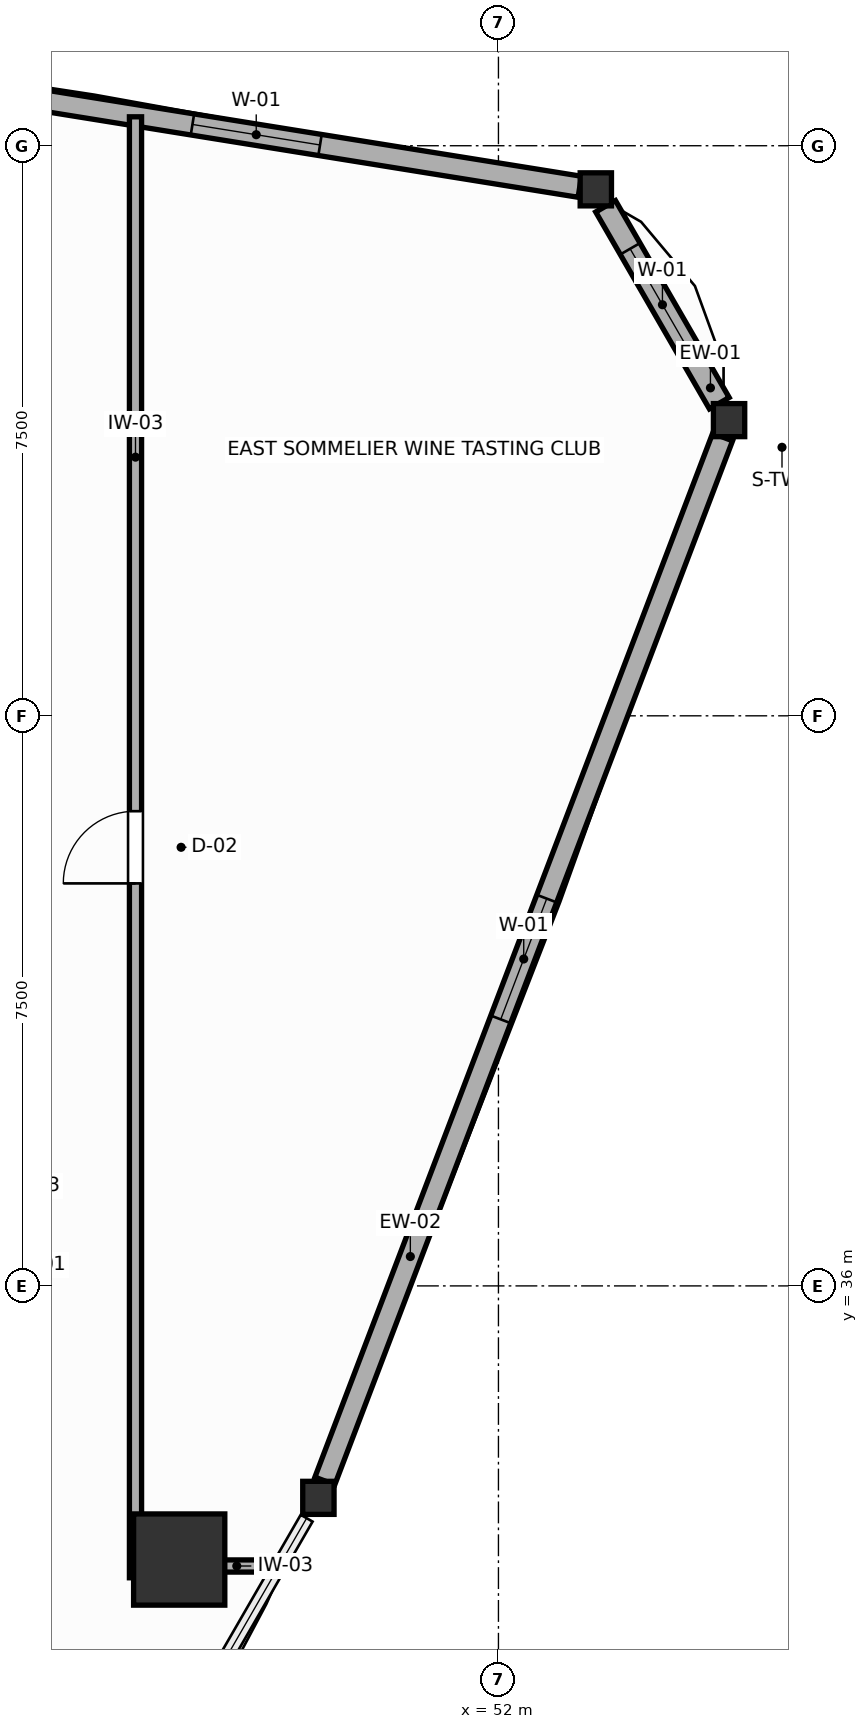
"""IFC4 building model, lengths in metres.
Left out: names, types, materials, properties, quantities, classifications, styles, units other than length and angle.
Written with IfcOpenShell. Run it as: python <this file> out.ifc"""

import sys

from ifc_helpers import new_model, si_unit, direction, frame, frame_2d, origin, origin_2d, place, context, subcontext, project, spatial, rectangle, i_section, extrude, source, transform, mapped, element, fill, save


model = new_model("IFC4")
c1 = context("Model", 3, precision=1e-05, world=origin(), true_north=direction((0.0, 1.0)))
c2 = subcontext(c1, "Body", "Model", "MODEL_VIEW")
j1 = project(units=[si_unit("LENGTHUNIT", "METRE"), si_unit("PLANEANGLEUNIT", "RADIAN")], contexts=[c1])
p1 = place(None, origin())
s1 = spatial("IfcSite", under=j1, at=p1, CompositionType="ELEMENT")
p2 = place(p1, origin())
s2 = spatial("IfcBuilding", under=s1, at=p2, CompositionType="ELEMENT")
p3 = place(p2, frame((0.0, 0.0, 150.6)))
s3 = spatial("IfcBuildingStorey", under=s2, at=p3, CompositionType="ELEMENT", Elevation=150.6)
m1 = source(origin(), c2, "Body", "SweptSolid", [
    extrude(rectangle(XDim=1.2, YDim=1.2, at=origin_2d()), origin(), (0.0, 0.0, 1.0), 3.6),
])
p4 = place(p3, frame((47.8, 32.4, 0.0), z_axis=(0.0, 0.0, 1.0), x_axis=(1.0, 0.0, 0.0)))
e1 = element("IfcColumn", 1, at=p4, inside=s3, PredefinedType="COLUMN", context=c2, shape_type="MappedRepresentation", body=[
    mapped(m1, transform((0.0, 0.0, 0.0), scale=1.0)),
])
m2 = source(origin(), c2, "Body", "SweptSolid", [
    extrude(i_section(OverallWidth=0.412, OverallDepth=0.435, WebThickness=0.033, FlangeThickness=0.053, FilletRadius=0.015, at=origin_2d()), origin(), (0.0, 0.0, 1.0), 3.6),
])
for number, where, z_axis, x_axis in (
    (2, (55.034, 47.39, 0.0), (0.0, 0.0, 1.0), (1.0, 0.0, 0.0)),
    (3, (53.281, 50.426, 0.0), (0.0, 0.0, 1.0), (1.0, 0.0, 0.0)),
    (4, (49.631, 33.212, 0.0), (0.0, 0.0, 1.0), (1.0, 0.0, 0.0)),
):
    element("IfcColumn", number, at=place(p3, frame(where, z_axis=z_axis, x_axis=x_axis)), inside=s3, PredefinedType="COLUMN", context=c2, shape_type="MappedRepresentation", body=[
        mapped(m2, transform((0.0, 0.0, 0.0), scale=1.0)),
    ])
p5 = place(p3, frame((54.906, 47.613, 0.0), z_axis=(0.0, 0.0, 1.0), x_axis=(-0.499974392705, 0.866040187658, 0.0)))
e5 = element("IfcWall", 5, at=p5, inside=s3, PredefinedType="SOLIDWALL", context=c2, shape_type="SweptSolid", body=[
    extrude(rectangle(XDim=2.992, YDim=0.3, at=frame_2d((1.496, 0.0))), origin(), (0.0, 0.0, 1.0), 3.0),
])
p6 = place(p5, frame((0.646, 0.0, 0.75)))
e6 = element("IfcOpeningElement", 6, at=p6, cuts=e5, PredefinedType="OPENING", context=c2, shape_type="SweptSolid", body=[
    extrude(rectangle(XDim=1.7, YDim=1.75, at=frame_2d((0.85, 0.875))), frame((0.0, 0.16, 0.0), z_axis=(0.0, -1.0, 0.0), x_axis=(1.0, 0.0, 0.0)), (0.0, 0.0, 1.0), 0.32),
])
p7 = place(p3, frame((53.07, 50.46, 0.0), z_axis=(0.0, 0.0, 1.0), x_axis=(-0.987303259595, 0.158846698404, 0.0)))
e7 = element("IfcWall", 7, at=p7, inside=s3, PredefinedType="SOLIDWALL", context=c2, shape_type="SweptSolid", body=[
    extrude(rectangle(XDim=14.746, YDim=0.28, at=frame_2d((7.373, 0.0))), origin(), (0.0, 0.0, 1.0), 3.0),
])
p8 = place(p7, frame((3.461, 0.0, 0.75)))
e8 = element("IfcOpeningElement", 8, at=p8, cuts=e7, PredefinedType="OPENING", context=c2, shape_type="SweptSolid", body=[
    extrude(rectangle(XDim=1.7, YDim=1.75, at=frame_2d((0.85, 0.875))), frame((0.0, 0.15, 0.0), z_axis=(0.0, -1.0, 0.0), x_axis=(1.0, 0.0, 0.0)), (0.0, 0.0, 1.0), 0.3),
])
p9 = place(p3, frame((49.716, 33.434, 0.0), z_axis=(0.0, 0.0, 1.0), x_axis=(0.356077530784, 0.934456415287, 0.0)))
e9 = element("IfcWall", 9, at=p9, inside=s3, PredefinedType="SOLIDWALL", context=c2, shape_type="SweptSolid", body=[
    extrude(rectangle(XDim=14.697, YDim=0.28, at=frame_2d((7.348, 0.0))), origin(), (0.0, 0.0, 1.0), 3.0),
])
p10 = place(p9, frame((6.498, 0.0, 0.75)))
e10 = element("IfcOpeningElement", 10, at=p10, cuts=e9, PredefinedType="OPENING", context=c2, shape_type="SweptSolid", body=[
    extrude(rectangle(XDim=1.7, YDim=1.75, at=frame_2d((0.85, 0.875))), frame((0.0, 0.15, 0.0), z_axis=(0.0, -1.0, 0.0), x_axis=(1.0, 0.0, 0.0)), (0.0, 0.0, 1.0), 0.3),
])
p11 = place(p3, frame((47.225, 32.16, 0.0), z_axis=(0.0, 0.0, 1.0), x_axis=(0.0, 1.0, 0.0)))
e11 = element("IfcWall", 11, at=p11, inside=s3, PredefinedType="PARTITIONING", context=c2, shape_type="SweptSolid", body=[
    extrude(rectangle(XDim=19.221, YDim=0.16, at=frame_2d((9.61, 0.0))), origin(), (0.0, 0.0, 1.0), 3.4),
])
p12 = place(p11, frame((9.135, 0.0, 0.0)))
e12 = element("IfcOpeningElement", 12, at=p12, cuts=e11, PredefinedType="OPENING", context=c2, shape_type="SweptSolid", body=[
    extrude(rectangle(XDim=0.95, YDim=2.05, at=frame_2d((0.475, 1.025))), frame((0.0, 0.09, 0.0), z_axis=(0.0, -1.0, 0.0), x_axis=(1.0, 0.0, 0.0)), (0.0, 0.0, 1.0), 0.18),
])
p13 = place(p3, frame((47.307, 32.315, 0.0), z_axis=(0.0, 0.0, 1.0), x_axis=(1.0, 0.0, 0.0)))
e13 = element("IfcWall", 13, at=p13, inside=s3, PredefinedType="PARTITIONING", context=c2, shape_type="SweptSolid", body=[
    extrude(rectangle(XDim=1.787, YDim=0.16, at=frame_2d((0.893, 0.0))), origin(), (0.0, 0.0, 1.0), 2.95),
])
p14 = place(p6, origin())
e14 = element("IfcWindow", 14, at=p14, inside=s3, PartitioningType="SINGLE_PANEL", PredefinedType="WINDOW", context=c2, shape_type="SweptSolid", body=[
    extrude(rectangle(XDim=1.7, YDim=1.75, at=frame_2d((0.85, 0.875))), frame((0.0, 0.03, 0.0), z_axis=(0.0, -1.0, 0.0), x_axis=(1.0, 0.0, 0.0)), (0.0, 0.0, 1.0), 0.06),
])
fill(e6, e14)
p15 = place(p8, origin())
e15 = element("IfcWindow", 15, at=p15, inside=s3, PartitioningType="SINGLE_PANEL", PredefinedType="WINDOW", context=c2, shape_type="SweptSolid", body=[
    extrude(rectangle(XDim=1.7, YDim=1.75, at=frame_2d((0.85, 0.875))), frame((0.0, 0.03, 0.0), z_axis=(0.0, -1.0, 0.0), x_axis=(1.0, 0.0, 0.0)), (0.0, 0.0, 1.0), 0.06),
])
fill(e8, e15)
p16 = place(p10, origin())
e16 = element("IfcWindow", 16, at=p16, inside=s3, PartitioningType="SINGLE_PANEL", PredefinedType="WINDOW", context=c2, shape_type="SweptSolid", body=[
    extrude(rectangle(XDim=1.7, YDim=1.75, at=frame_2d((0.85, 0.875))), frame((0.0, 0.03, 0.0), z_axis=(0.0, -1.0, 0.0), x_axis=(1.0, 0.0, 0.0)), (0.0, 0.0, 1.0), 0.06),
])
fill(e10, e16)
p17 = place(p12, origin())
e17 = element("IfcDoor", 17, at=p17, inside=s3, OperationType="SINGLE_SWING_LEFT", PredefinedType="DOOR", context=c2, shape_type="SweptSolid", body=[
    extrude(rectangle(XDim=0.95, YDim=2.05, at=frame_2d((0.475, 1.025))), frame((0.0, 0.025, 0.0), z_axis=(0.0, -1.0, 0.0), x_axis=(1.0, 0.0, 0.0)), (0.0, 0.0, 1.0), 0.05),
])
fill(e12, e17)
save(model, sys.argv[1])
